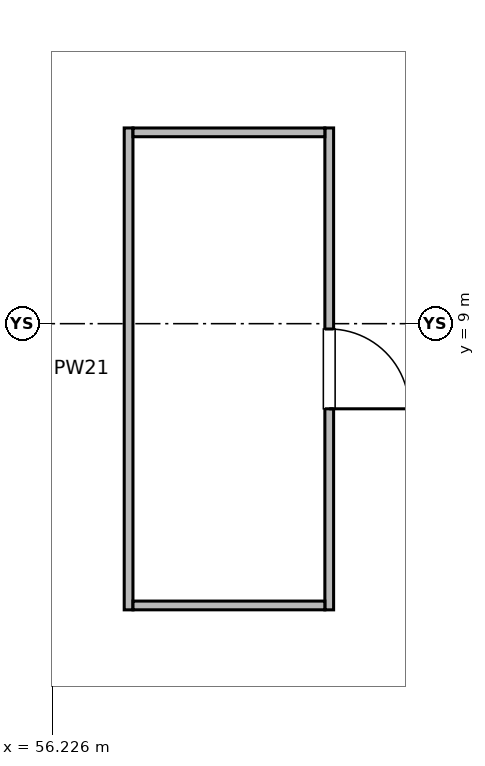
"""IFC4 building model, lengths in metres.
Left out: names, types, materials, properties, quantities, classifications, styles, units other than length and angle.
Written with IfcOpenShell. Run it as: python <this file> out.ifc"""

import sys

from ifc_helpers import new_model, si_unit, direction, frame, frame_2d, origin, place, context, subcontext, project, spatial, rectangle, extrude, element, fill, save


model = new_model("IFC4")
c1 = context("Model", 3, precision=1e-05, world=origin(), true_north=direction((0.0, 1.0)))
c2 = subcontext(c1, "Body", "Model", "MODEL_VIEW")
j1 = project(units=[si_unit("LENGTHUNIT", "METRE"), si_unit("PLANEANGLEUNIT", "RADIAN")], contexts=[c1])
p1 = place(None, origin())
s1 = spatial("IfcSite", under=j1, at=p1, CompositionType="ELEMENT")
p2 = place(p1, origin())
s2 = spatial("IfcBuilding", under=s1, at=p2, CompositionType="ELEMENT")
p3 = place(p2, origin())
s3 = spatial("IfcBuildingStorey", under=s2, at=p3, CompositionType="ELEMENT", Elevation=0.0)
p4 = place(p3, frame((59.872, 11.575, 0.0), z_axis=(0.0, 0.0, 1.0), x_axis=(0.0, -1.0, 0.0)))
e1 = element("IfcWall", 1, at=p4, inside=s3, PredefinedType="PARTITIONING", context=c2, shape_type="SweptSolid", body=[
    extrude(rectangle(XDim=6.34, YDim=0.115, at=frame_2d((3.17, 0.0))), origin(), (0.0, 0.0, 1.0), 5.02),
])
p5 = place(p4, frame((2.645, 0.0, 0.0)))
e2 = element("IfcOpeningElement", 2, at=p5, cuts=e1, PredefinedType="OPENING", context=c2, shape_type="SweptSolid", body=[
    extrude(rectangle(XDim=1.05, YDim=2.25, at=frame_2d((0.525, 1.125))), frame((0.0, 0.067, 0.0), z_axis=(0.0, -1.0, 0.0), x_axis=(1.0, 0.0, 0.0)), (0.0, 0.0, 1.0), 0.135),
])
p6 = place(p3, frame((57.232, 5.235, 0.0), z_axis=(0.0, 0.0, 1.0), x_axis=(0.0, 1.0, 0.0)))
e3 = element("IfcWall", 3, at=p6, inside=s3, PredefinedType="PARTITIONING", context=c2, shape_type="SweptSolid", body=[
    extrude(rectangle(XDim=6.34, YDim=0.115, at=frame_2d((3.17, 0.0))), origin(), (0.0, 0.0, 1.0), 5.02),
])
for number, where, z_axis, x_axis in (
    (4, (57.29, 5.293, 0.0), (0.0, 0.0, 1.0), (1.0, 0.0, 0.0)),
    (5, (57.29, 11.517, 0.0), (0.0, 0.0, 1.0), (1.0, 0.0, 0.0)),
):
    element("IfcWall", number, at=place(p3, frame(where, z_axis=z_axis, x_axis=x_axis)), inside=s3, PredefinedType="PARTITIONING", context=c2, shape_type="SweptSolid", body=[
        extrude(rectangle(XDim=2.524, YDim=0.115, at=frame_2d((1.262, 0.0))), origin(), (0.0, 0.0, 1.0), 5.02),
    ])
p7 = place(p5, origin())
e6 = element("IfcDoor", 6, at=p7, inside=s3, OperationType="SINGLE_SWING_RIGHT", PredefinedType="DOOR", context=c2, shape_type="SweptSolid", body=[
    extrude(rectangle(XDim=1.05, YDim=2.25, at=frame_2d((0.525, 1.125))), frame((0.0, 0.025, 0.0), z_axis=(0.0, -1.0, 0.0), x_axis=(1.0, 0.0, 0.0)), (0.0, 0.0, 1.0), 0.05),
])
fill(e2, e6)
save(model, sys.argv[1])
